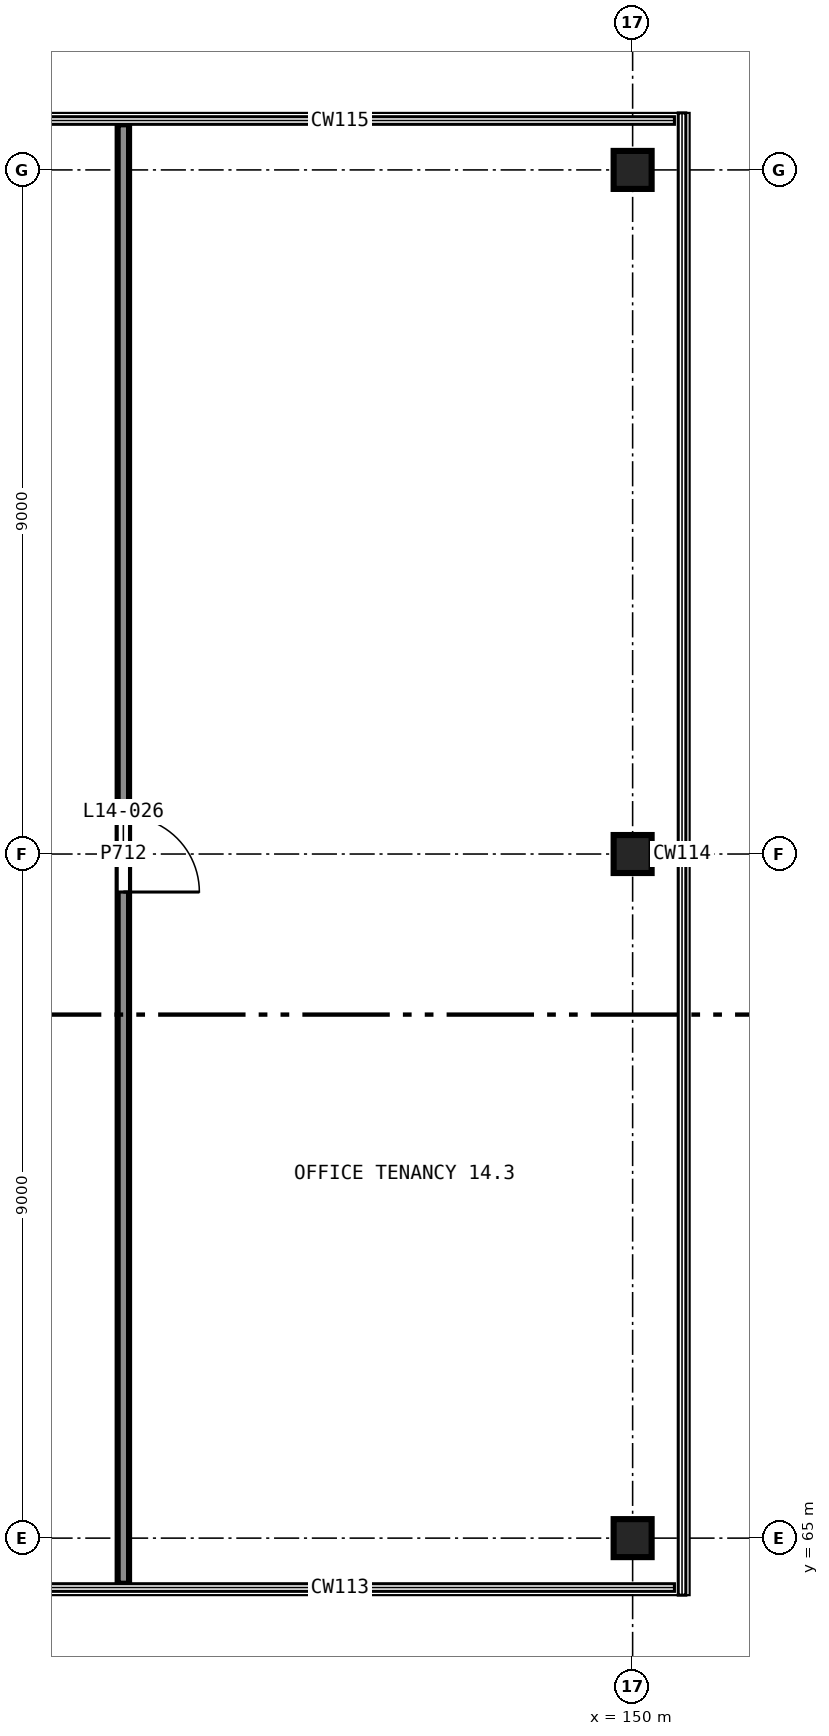
"""IFC4 building model, lengths in metres.
Left out: names, types, materials, properties, quantities, classifications, styles, units other than length and angle.
Written with IfcOpenShell. Run it as: python <this file> out.ifc"""

import sys

from ifc_helpers import new_model, si_unit, direction, frame, frame_2d, origin, origin_2d, place, context, subcontext, project, spatial, rectangle, extrude, element, fill, save


model = new_model("IFC4")
c1 = context("Model", 3, precision=1e-05, world=origin(), true_north=direction((0.0, 1.0)))
c2 = subcontext(c1, "Body", "Model", "MODEL_VIEW")
j1 = project(units=[si_unit("LENGTHUNIT", "METRE"), si_unit("PLANEANGLEUNIT", "RADIAN")], contexts=[c1])
p1 = place(None, origin())
s1 = spatial("IfcSite", under=j1, at=p1, CompositionType="ELEMENT")
p2 = place(p1, origin())
s2 = spatial("IfcBuilding", under=s1, at=p2, CompositionType="ELEMENT")
p3 = place(p2, frame((0.0, 0.0, 57.5)))
s3 = spatial("IfcBuildingStorey", under=s2, at=p3, CompositionType="ELEMENT", Elevation=57.5)
for number, where, z_axis, x_axis in (
    (1, (150.0, 65.0, 0.0), (0.0, 0.0, 1.0), (1.0, 0.0, 0.0)),
    (2, (150.0, 74.0, 0.0), (0.0, 0.0, 1.0), (1.0, 0.0, 0.0)),
    (3, (150.0, 83.0, 0.0), (0.0, 0.0, 1.0), (1.0, 0.0, 0.0)),
):
    element("IfcColumn", number, at=place(p3, frame(where, z_axis=z_axis, x_axis=x_axis)), inside=s3, PredefinedType="COLUMN", context=c2, shape_type="SweptSolid", body=[
        extrude(rectangle(XDim=0.5, YDim=0.5, at=origin_2d()), origin(), (0.0, 0.0, 1.0), 4.0),
    ])
p4 = place(p3, frame((143.3, 83.6, 0.0), z_axis=(0.0, 0.0, 1.0), x_axis=(0.0, -1.0, 0.0)))
e4 = element("IfcWall", 4, at=p4, inside=s3, PredefinedType="PARTITIONING", context=c2, shape_type="SweptSolid", body=[
    extrude(rectangle(XDim=19.2, YDim=0.15, at=frame_2d((9.6, 0.0))), origin(), (0.0, 0.0, 1.0), 3.75),
])
p5 = place(p4, frame((9.1, 0.0, 0.0)))
e5 = element("IfcOpeningElement", 5, at=p5, cuts=e4, PredefinedType="OPENING", context=c2, shape_type="SweptSolid", body=[
    extrude(rectangle(XDim=1.0, YDim=2.1, at=frame_2d((0.5, 1.05))), frame((0.0, 0.085, 0.0), z_axis=(0.0, -1.0, 0.0), x_axis=(1.0, 0.0, 0.0)), (0.0, 0.0, 1.0), 0.17),
])
p6 = place(p5, origin())
e6 = element("IfcDoor", 6, at=p6, inside=s3, OperationType="SINGLE_SWING_LEFT", PredefinedType="DOOR", context=c2, shape_type="SweptSolid", body=[
    extrude(rectangle(XDim=1.0, YDim=2.1, at=frame_2d((0.5, 1.05))), frame((0.0, 0.025, 0.0), z_axis=(0.0, -1.0, 0.0), x_axis=(1.0, 0.0, 0.0)), (0.0, 0.0, 1.0), 0.05),
])
fill(e5, e6)
save(model, sys.argv[1])
